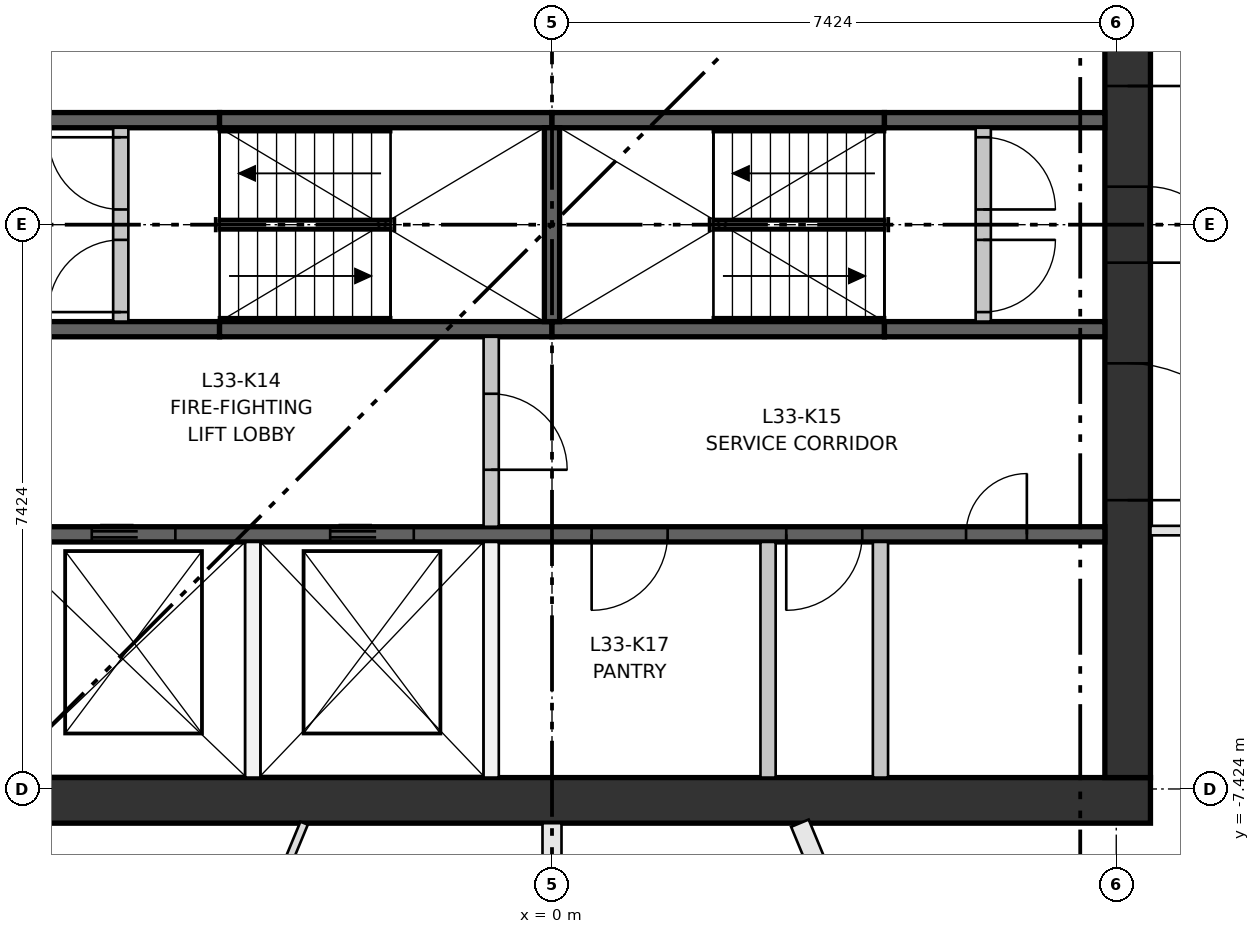
"""IFC4 building model, lengths in metres.
Left out: names, types, materials, properties, quantities, classifications, styles, units other than length and angle.
Written with IfcOpenShell. Run it as: python <this file> out.ifc"""

import sys

from ifc_helpers import new_model, si_unit, direction, frame, frame_2d, origin, place, context, subcontext, project, spatial, rectangle, extrude, element, fill, save


model = new_model("IFC4")
c1 = context("Model", 3, precision=1e-05, world=origin(), true_north=direction((0.0, 1.0)))
c2 = subcontext(c1, "Body", "Model", "MODEL_VIEW")
j1 = project(units=[si_unit("LENGTHUNIT", "METRE"), si_unit("PLANEANGLEUNIT", "RADIAN")], contexts=[c1])
p1 = place(None, origin())
s1 = spatial("IfcSite", under=j1, at=p1, CompositionType="ELEMENT")
p2 = place(p1, origin())
s2 = spatial("IfcBuilding", under=s1, at=p2, CompositionType="ELEMENT")
p3 = place(p2, frame((0.0, 0.0, 127.65)))
s3 = spatial("IfcBuildingStorey", under=s2, at=p3, CompositionType="ELEMENT", Elevation=127.65)
p4 = place(p3, frame((-7.874, -7.574, 0.0), z_axis=(0.0, 0.0, 1.0), x_axis=(1.0, 0.0, 0.0)))
e1 = element("IfcWall", 1, at=p4, inside=s3, PredefinedType="SHEAR", context=c2, shape_type="SweptSolid", body=[
    extrude(rectangle(XDim=15.748, YDim=0.6, at=frame_2d((7.874, 0.0))), origin(), (0.0, 0.0, 1.0), 3.35),
])
p5 = place(p3, frame((7.574, -7.274, 0.0), z_axis=(0.0, 0.0, 1.0), x_axis=(0.0, 1.0, 0.0)))
e2 = element("IfcWall", 2, at=p5, inside=s3, PredefinedType="SHEAR", context=c2, shape_type="SweptSolid", body=[
    extrude(rectangle(XDim=14.548, YDim=0.6, at=frame_2d((7.274, 0.0))), origin(), (0.0, 0.0, 1.0), 3.35),
])
p6 = place(p5, frame((6.774, 0.0, 0.0)))
e3 = element("IfcOpeningElement", 3, at=p6, cuts=e2, PredefinedType="OPENING", context=c2, shape_type="SweptSolid", body=[
    extrude(rectangle(XDim=1.0, YDim=2.1, at=frame_2d((0.5, 1.05))), frame((0.0, 0.31, 0.0), z_axis=(0.0, -1.0, 0.0), x_axis=(1.0, 0.0, 0.0)), (0.0, 0.0, 1.0), 0.62),
])
p7 = place(p5, frame((3.649, 0.0, 0.0)))
e4 = element("IfcOpeningElement", 4, at=p7, cuts=e2, PredefinedType="OPENING", context=c2, shape_type="SweptSolid", body=[
    extrude(rectangle(XDim=1.8, YDim=2.1, at=frame_2d((0.9, 1.05))), frame((0.0, 0.31, 0.0), z_axis=(0.0, -1.0, 0.0), x_axis=(1.0, 0.0, 0.0)), (0.0, 0.0, 1.0), 0.62),
])
p8 = place(p5, frame((9.098, 0.0, 0.0)))
e5 = element("IfcOpeningElement", 5, at=p8, cuts=e2, PredefinedType="OPENING", context=c2, shape_type="SweptSolid", body=[
    extrude(rectangle(XDim=1.8, YDim=2.1, at=frame_2d((0.9, 1.05))), frame((0.0, 0.31, 0.0), z_axis=(0.0, -1.0, 0.0), x_axis=(1.0, 0.0, 0.0)), (0.0, 0.0, 1.0), 0.62),
])
p9 = place(p3, frame((-7.274, -4.074, 0.0), z_axis=(0.0, 0.0, 1.0), x_axis=(1.0, 0.0, 0.0)))
e6 = element("IfcWall", 6, at=p9, inside=s3, PredefinedType="SHEAR", context=c2, shape_type="SweptSolid", body=[
    extrude(rectangle(XDim=14.548, YDim=0.2, at=frame_2d((7.274, 0.0))), origin(), (0.0, 0.0, 1.0), 3.0),
])
p10 = place(p9, frame((1.219, 0.0, 0.0)))
e7 = element("IfcOpeningElement", 7, at=p10, cuts=e6, PredefinedType="OPENING", context=c2, shape_type="SweptSolid", body=[
    extrude(rectangle(XDim=1.1, YDim=2.1, at=frame_2d((0.55, 1.05))), frame((0.0, 0.11, 0.0), z_axis=(0.0, -1.0, 0.0), x_axis=(1.0, 0.0, 0.0)), (0.0, 0.0, 1.0), 0.22),
])
p11 = place(p9, frame((4.355, 0.0, 0.0)))
e8 = element("IfcOpeningElement", 8, at=p11, cuts=e6, PredefinedType="OPENING", context=c2, shape_type="SweptSolid", body=[
    extrude(rectangle(XDim=1.1, YDim=2.1, at=frame_2d((0.55, 1.05))), frame((0.0, 0.11, 0.0), z_axis=(0.0, -1.0, 0.0), x_axis=(1.0, 0.0, 0.0)), (0.0, 0.0, 1.0), 0.22),
])
p12 = place(p9, frame((7.795, 0.0, 0.0)))
e9 = element("IfcOpeningElement", 9, at=p12, cuts=e6, PredefinedType="OPENING", context=c2, shape_type="SweptSolid", body=[
    extrude(rectangle(XDim=1.0, YDim=2.1, at=frame_2d((0.5, 1.05))), frame((0.0, 0.11, 0.0), z_axis=(0.0, -1.0, 0.0), x_axis=(1.0, 0.0, 0.0)), (0.0, 0.0, 1.0), 0.22),
])
p13 = place(p9, frame((10.356, 0.0, 0.0)))
e10 = element("IfcOpeningElement", 10, at=p13, cuts=e6, PredefinedType="OPENING", context=c2, shape_type="SweptSolid", body=[
    extrude(rectangle(XDim=1.0, YDim=2.1, at=frame_2d((0.5, 1.05))), frame((0.0, 0.11, 0.0), z_axis=(0.0, -1.0, 0.0), x_axis=(1.0, 0.0, 0.0)), (0.0, 0.0, 1.0), 0.22),
])
p14 = place(p9, frame((12.722, 0.0, 0.0)))
e11 = element("IfcOpeningElement", 11, at=p14, cuts=e6, PredefinedType="OPENING", context=c2, shape_type="SweptSolid", body=[
    extrude(rectangle(XDim=0.8, YDim=2.1, at=frame_2d((0.4, 1.05))), frame((0.0, 0.11, 0.0), z_axis=(0.0, -1.0, 0.0), x_axis=(1.0, 0.0, 0.0)), (0.0, 0.0, 1.0), 0.22),
])
p15 = place(p3, frame((-7.274, -1.375, 0.0), z_axis=(0.0, 0.0, 1.0), x_axis=(1.0, 0.0, 0.0)))
e12 = element("IfcWall", 12, at=p15, inside=s3, PredefinedType="SHEAR", context=c2, shape_type="SweptSolid", body=[
    extrude(rectangle(XDim=2.9, YDim=0.2, at=frame_2d((1.45, 0.0))), origin(), (0.0, 0.0, 1.0), 3.0),
])
for number, where, z_axis, x_axis in (
    (13, (-4.374, -1.375, 0.0), (0.0, 0.0, 1.0), (1.0, 0.0, 0.0)),
    (14, (0.0, -1.375, 0.0), (0.0, 0.0, 1.0), (1.0, 0.0, 0.0)),
):
    element("IfcWall", number, at=place(p3, frame(where, z_axis=z_axis, x_axis=x_axis)), inside=s3, PredefinedType="SHEAR", context=c2, shape_type="SweptSolid", body=[
        extrude(rectangle(XDim=4.374, YDim=0.2, at=frame_2d((2.187, 0.0))), origin(), (0.0, 0.0, 1.0), 3.0),
    ])
for number, where, z_axis, x_axis in (
    (15, (4.374, -1.375, 0.0), (0.0, 0.0, 1.0), (1.0, 0.0, 0.0)),
    (16, (-7.274, 1.375, 0.0), (0.0, 0.0, 1.0), (1.0, 0.0, 0.0)),
):
    element("IfcWall", number, at=place(p3, frame(where, z_axis=z_axis, x_axis=x_axis)), inside=s3, PredefinedType="SHEAR", context=c2, shape_type="SweptSolid", body=[
        extrude(rectangle(XDim=2.9, YDim=0.2, at=frame_2d((1.45, 0.0))), origin(), (0.0, 0.0, 1.0), 3.0),
    ])
for number, where, z_axis, x_axis in (
    (17, (-4.374, 1.375, 0.0), (0.0, 0.0, 1.0), (1.0, 0.0, 0.0)),
    (18, (0.0, 1.375, 0.0), (0.0, 0.0, 1.0), (1.0, 0.0, 0.0)),
):
    element("IfcWall", number, at=place(p3, frame(where, z_axis=z_axis, x_axis=x_axis)), inside=s3, PredefinedType="SHEAR", context=c2, shape_type="SweptSolid", body=[
        extrude(rectangle(XDim=4.374, YDim=0.2, at=frame_2d((2.187, 0.0))), origin(), (0.0, 0.0, 1.0), 3.0),
    ])
p16 = place(p3, frame((4.374, 1.375, 0.0), z_axis=(0.0, 0.0, 1.0), x_axis=(1.0, 0.0, 0.0)))
e19 = element("IfcWall", 19, at=p16, inside=s3, PredefinedType="SHEAR", context=c2, shape_type="SweptSolid", body=[
    extrude(rectangle(XDim=2.9, YDim=0.2, at=frame_2d((1.45, 0.0))), origin(), (0.0, 0.0, 1.0), 3.0),
])
p17 = place(p3, frame((0.0, -1.275, 0.0), z_axis=(0.0, 0.0, 1.0), x_axis=(0.0, 1.0, 0.0)))
e20 = element("IfcWall", 20, at=p17, inside=s3, PredefinedType="SHEAR", context=c2, shape_type="SweptSolid", body=[
    extrude(rectangle(XDim=2.55, YDim=0.2, at=frame_2d((1.275, 0.0))), origin(), (0.0, 0.0, 1.0), 3.0),
])
for number, where, z_axis, x_axis in (
    (21, (-3.937, -7.274, 0.0), (0.0, 0.0, 1.0), (0.0, 1.0, 0.0)),
    (22, (-0.8, -7.274, 0.0), (0.0, 0.0, 1.0), (0.0, 1.0, 0.0)),
):
    element("IfcWall", number, at=place(p3, frame(where, z_axis=z_axis, x_axis=x_axis)), inside=s3, PredefinedType="PARTITIONING", context=c2, shape_type="SweptSolid", body=[
        extrude(rectangle(XDim=3.1, YDim=0.2, at=frame_2d((1.55, 0.0))), origin(), (0.0, 0.0, 1.0), 3.0),
    ])
p18 = place(p3, frame((-0.8, -3.974, 0.0), z_axis=(0.0, 0.0, 1.0), x_axis=(0.0, 1.0, 0.0)))
e23 = element("IfcWall", 23, at=p18, inside=s3, PredefinedType="PARTITIONING", context=c2, shape_type="SweptSolid", body=[
    extrude(rectangle(XDim=2.499, YDim=0.2, at=frame_2d((1.25, 0.0))), origin(), (0.0, 0.0, 1.0), 3.0),
])
p19 = place(p18, frame((0.75, 0.0, 0.0)))
e24 = element("IfcOpeningElement", 24, at=p19, cuts=e23, PredefinedType="OPENING", context=c2, shape_type="SweptSolid", body=[
    extrude(rectangle(XDim=1.0, YDim=2.1, at=frame_2d((0.5, 1.05))), frame((0.0, 0.11, 0.0), z_axis=(0.0, -1.0, 0.0), x_axis=(1.0, 0.0, 0.0)), (0.0, 0.0, 1.0), 0.22),
])
for number, where, z_axis, x_axis in (
    (25, (2.843, -7.274, 0.0), (0.0, 0.0, 1.0), (0.0, 1.0, 0.0)),
    (26, (4.322, -7.274, 0.0), (0.0, 0.0, 1.0), (0.0, 1.0, 0.0)),
):
    element("IfcWall", number, at=place(p3, frame(where, z_axis=z_axis, x_axis=x_axis)), inside=s3, PredefinedType="PARTITIONING", context=c2, shape_type="SweptSolid", body=[
        extrude(rectangle(XDim=3.1, YDim=0.2, at=frame_2d((1.55, 0.0))), origin(), (0.0, 0.0, 1.0), 3.0),
    ])
p20 = place(p3, frame((-5.674, -1.275, 0.0), z_axis=(0.0, 0.0, 1.0), x_axis=(0.0, 1.0, 0.0)))
e27 = element("IfcWall", 27, at=p20, inside=s3, PredefinedType="PARTITIONING", context=c2, shape_type="SweptSolid", body=[
    extrude(rectangle(XDim=2.55, YDim=0.2, at=frame_2d((1.275, 0.0))), origin(), (0.0, 0.0, 1.0), 3.0),
])
p21 = place(p20, frame((0.125, 0.0, 0.0)))
e28 = element("IfcOpeningElement", 28, at=p21, cuts=e27, PredefinedType="OPENING", context=c2, shape_type="SweptSolid", body=[
    extrude(rectangle(XDim=0.95, YDim=2.1, at=frame_2d((0.475, 1.05))), frame((0.0, 0.11, 0.0), z_axis=(0.0, -1.0, 0.0), x_axis=(1.0, 0.0, 0.0)), (0.0, 0.0, 1.0), 0.22),
])
p22 = place(p20, frame((1.475, 0.0, 0.0)))
e29 = element("IfcOpeningElement", 29, at=p22, cuts=e27, PredefinedType="OPENING", context=c2, shape_type="SweptSolid", body=[
    extrude(rectangle(XDim=0.95, YDim=2.1, at=frame_2d((0.475, 1.05))), frame((0.0, 0.11, 0.0), z_axis=(0.0, -1.0, 0.0), x_axis=(1.0, 0.0, 0.0)), (0.0, 0.0, 1.0), 0.22),
])
p23 = place(p3, frame((5.674, -1.275, 0.0), z_axis=(0.0, 0.0, 1.0), x_axis=(0.0, 1.0, 0.0)))
e30 = element("IfcWall", 30, at=p23, inside=s3, PredefinedType="PARTITIONING", context=c2, shape_type="SweptSolid", body=[
    extrude(rectangle(XDim=2.55, YDim=0.2, at=frame_2d((1.275, 0.0))), origin(), (0.0, 0.0, 1.0), 3.0),
])
p24 = place(p23, frame((0.125, 0.0, 0.0)))
e31 = element("IfcOpeningElement", 31, at=p24, cuts=e30, PredefinedType="OPENING", context=c2, shape_type="SweptSolid", body=[
    extrude(rectangle(XDim=0.95, YDim=2.1, at=frame_2d((0.475, 1.05))), frame((0.0, 0.11, 0.0), z_axis=(0.0, -1.0, 0.0), x_axis=(1.0, 0.0, 0.0)), (0.0, 0.0, 1.0), 0.22),
])
p25 = place(p23, frame((1.475, 0.0, 0.0)))
e32 = element("IfcOpeningElement", 32, at=p25, cuts=e30, PredefinedType="OPENING", context=c2, shape_type="SweptSolid", body=[
    extrude(rectangle(XDim=0.95, YDim=2.1, at=frame_2d((0.475, 1.05))), frame((0.0, 0.11, 0.0), z_axis=(0.0, -1.0, 0.0), x_axis=(1.0, 0.0, 0.0)), (0.0, 0.0, 1.0), 0.22),
])
p26 = place(p3, frame((13.258, -4.024, 0.0), z_axis=(0.0, 0.0, 1.0), x_axis=(-1.0, 0.0, 0.0)))
e33 = element("IfcWall", 33, at=p26, inside=s3, PredefinedType="PARTITIONING", context=c2, shape_type="SweptSolid", body=[
    extrude(rectangle(XDim=5.384, YDim=0.125, at=frame_2d((2.692, 0.0))), origin(), (0.0, 0.0, 1.0), 3.0),
])
p27 = place(p26, frame((1.8, 0.0, 0.0)))
e34 = element("IfcOpeningElement", 34, at=p27, cuts=e33, PredefinedType="OPENING", context=c2, shape_type="SweptSolid", body=[
    extrude(rectangle(XDim=1.8, YDim=2.1, at=frame_2d((0.9, 1.05))), frame((0.0, 0.073, 0.0), z_axis=(0.0, -1.0, 0.0), x_axis=(1.0, 0.0, 0.0)), (0.0, 0.0, 1.0), 0.145),
])
p28 = place(p3, frame((-3.261, -7.874, 0.0), z_axis=(0.0, 0.0, 1.0), x_axis=(-0.382671840259, -0.923884334034, 0.0)))
e35 = element("IfcWall", 35, at=p28, inside=s3, PredefinedType="PARTITIONING", context=c2, shape_type="SweptSolid", body=[
    extrude(rectangle(XDim=6.737, YDim=0.105, at=frame_2d((3.369, 0.0))), origin(), (0.0, 0.0, 1.0), 3.0),
])
p29 = place(p3, frame((0.0, -7.874, 0.0), z_axis=(0.0, 0.0, 1.0), x_axis=(0.0, -1.0, 0.0)))
e36 = element("IfcWall", 36, at=p29, inside=s3, PredefinedType="PARTITIONING", context=c2, shape_type="SweptSolid", body=[
    extrude(rectangle(XDim=7.255, YDim=0.25, at=frame_2d((3.627, 0.0))), origin(), (0.0, 0.0, 1.0), 3.0),
])
p30 = place(p3, frame((5.84, -14.098, 0.0), z_axis=(0.0, 0.0, 1.0), x_axis=(-0.382671840259, 0.923884334034, 0.0)))
e37 = element("IfcWall", 37, at=p30, inside=s3, PredefinedType="PARTITIONING", context=c2, shape_type="SweptSolid", body=[
    extrude(rectangle(XDim=6.737, YDim=0.25, at=frame_2d((3.369, 0.0))), origin(), (0.0, 0.0, 1.0), 3.0),
])
p31 = place(p30, frame((2.9, 0.0, 0.0)))
e38 = element("IfcOpeningElement", 38, at=p31, cuts=e37, PredefinedType="OPENING", context=c2, shape_type="SweptSolid", body=[
    extrude(rectangle(XDim=1.0, YDim=2.1, at=frame_2d((0.5, 1.05))), frame((0.0, 0.135, 0.0), z_axis=(0.0, -1.0, 0.0), x_axis=(1.0, 0.0, 0.0)), (0.0, 0.0, 1.0), 0.27),
])
p32 = place(p10, origin())
e39 = element("IfcDoor", 39, at=p32, inside=s3, OperationType="DOUBLE_DOOR_SLIDING", PredefinedType="DOOR", context=c2, shape_type="SweptSolid", body=[
    extrude(rectangle(XDim=1.1, YDim=2.1, at=frame_2d((0.55, 1.05))), frame((0.0, 0.025, 0.0), z_axis=(0.0, -1.0, 0.0), x_axis=(1.0, 0.0, 0.0)), (0.0, 0.0, 1.0), 0.05),
])
fill(e7, e39)
p33 = place(p11, origin())
e40 = element("IfcDoor", 40, at=p33, inside=s3, OperationType="DOUBLE_DOOR_SLIDING", PredefinedType="DOOR", context=c2, shape_type="SweptSolid", body=[
    extrude(rectangle(XDim=1.1, YDim=2.1, at=frame_2d((0.55, 1.05))), frame((0.0, 0.025, 0.0), z_axis=(0.0, -1.0, 0.0), x_axis=(1.0, 0.0, 0.0)), (0.0, 0.0, 1.0), 0.05),
])
fill(e8, e40)
p34 = place(p21, origin())
e41 = element("IfcDoor", 41, at=p34, inside=s3, OperationType="SINGLE_SWING_LEFT", PredefinedType="DOOR", context=c2, shape_type="SweptSolid", body=[
    extrude(rectangle(XDim=0.95, YDim=2.1, at=frame_2d((0.475, 1.05))), frame((0.0, 0.025, 0.0), z_axis=(0.0, -1.0, 0.0), x_axis=(1.0, 0.0, 0.0)), (0.0, 0.0, 1.0), 0.05),
])
fill(e28, e41)
p35 = place(p22, origin())
e42 = element("IfcDoor", 42, at=p35, inside=s3, OperationType="SINGLE_SWING_RIGHT", PredefinedType="DOOR", context=c2, shape_type="SweptSolid", body=[
    extrude(rectangle(XDim=0.95, YDim=2.1, at=frame_2d((0.475, 1.05))), frame((0.0, 0.025, 0.0), z_axis=(0.0, -1.0, 0.0), x_axis=(1.0, 0.0, 0.0)), (0.0, 0.0, 1.0), 0.05),
])
fill(e29, e42)
p36 = place(p24, frame((0.95, 0.0, 0.0), z_axis=(0.0, 0.0, 1.0), x_axis=(-1.0, 0.0, 0.0)))
e43 = element("IfcDoor", 43, at=p36, inside=s3, OperationType="SINGLE_SWING_RIGHT", PredefinedType="DOOR", context=c2, shape_type="SweptSolid", body=[
    extrude(rectangle(XDim=0.95, YDim=2.1, at=frame_2d((0.475, 1.05))), frame((0.0, 0.025, 0.0), z_axis=(0.0, -1.0, 0.0), x_axis=(1.0, 0.0, 0.0)), (0.0, 0.0, 1.0), 0.05),
])
fill(e31, e43)
p37 = place(p25, frame((0.95, 0.0, 0.0), z_axis=(0.0, 0.0, 1.0), x_axis=(-1.0, 0.0, 0.0)))
e44 = element("IfcDoor", 44, at=p37, inside=s3, OperationType="SINGLE_SWING_LEFT", PredefinedType="DOOR", context=c2, shape_type="SweptSolid", body=[
    extrude(rectangle(XDim=0.95, YDim=2.1, at=frame_2d((0.475, 1.05))), frame((0.0, 0.025, 0.0), z_axis=(0.0, -1.0, 0.0), x_axis=(1.0, 0.0, 0.0)), (0.0, 0.0, 1.0), 0.05),
])
fill(e32, e44)
p38 = place(p19, frame((1.0, 0.0, 0.0), z_axis=(0.0, 0.0, 1.0), x_axis=(-1.0, 0.0, 0.0)))
e45 = element("IfcDoor", 45, at=p38, inside=s3, OperationType="SINGLE_SWING_LEFT", PredefinedType="DOOR", context=c2, shape_type="SweptSolid", body=[
    extrude(rectangle(XDim=1.0, YDim=2.1, at=frame_2d((0.5, 1.05))), frame((0.0, 0.025, 0.0), z_axis=(0.0, -1.0, 0.0), x_axis=(1.0, 0.0, 0.0)), (0.0, 0.0, 1.0), 0.05),
])
fill(e24, e45)
p39 = place(p12, frame((1.0, 0.0, 0.0), z_axis=(0.0, 0.0, 1.0), x_axis=(-1.0, 0.0, 0.0)))
e46 = element("IfcDoor", 46, at=p39, inside=s3, OperationType="SINGLE_SWING_LEFT", PredefinedType="DOOR", context=c2, shape_type="SweptSolid", body=[
    extrude(rectangle(XDim=1.0, YDim=2.1, at=frame_2d((0.5, 1.05))), frame((0.0, 0.025, 0.0), z_axis=(0.0, -1.0, 0.0), x_axis=(1.0, 0.0, 0.0)), (0.0, 0.0, 1.0), 0.05),
])
fill(e9, e46)
p40 = place(p13, frame((1.0, 0.0, 0.0), z_axis=(0.0, 0.0, 1.0), x_axis=(-1.0, 0.0, 0.0)))
e47 = element("IfcDoor", 47, at=p40, inside=s3, OperationType="SINGLE_SWING_LEFT", PredefinedType="DOOR", context=c2, shape_type="SweptSolid", body=[
    extrude(rectangle(XDim=1.0, YDim=2.1, at=frame_2d((0.5, 1.05))), frame((0.0, 0.025, 0.0), z_axis=(0.0, -1.0, 0.0), x_axis=(1.0, 0.0, 0.0)), (0.0, 0.0, 1.0), 0.05),
])
fill(e10, e47)
p41 = place(p14, origin())
e48 = element("IfcDoor", 48, at=p41, inside=s3, OperationType="SINGLE_SWING_RIGHT", PredefinedType="DOOR", context=c2, shape_type="SweptSolid", body=[
    extrude(rectangle(XDim=0.8, YDim=2.1, at=frame_2d((0.4, 1.05))), frame((0.0, 0.025, 0.0), z_axis=(0.0, -1.0, 0.0), x_axis=(1.0, 0.0, 0.0)), (0.0, 0.0, 1.0), 0.05),
])
fill(e11, e48)
p42 = place(p6, frame((1.0, 0.0, 0.0), z_axis=(0.0, 0.0, 1.0), x_axis=(-1.0, 0.0, 0.0)))
e49 = element("IfcDoor", 49, at=p42, inside=s3, OperationType="SINGLE_SWING_LEFT", PredefinedType="DOOR", context=c2, shape_type="SweptSolid", body=[
    extrude(rectangle(XDim=1.0, YDim=2.1, at=frame_2d((0.5, 1.05))), frame((0.0, 0.3, 0.0), z_axis=(0.0, -1.0, 0.0), x_axis=(1.0, 0.0, 0.0)), (0.0, 0.0, 1.0), 0.05),
])
fill(e3, e49)
p43 = place(p7, frame((1.8, 0.0, 0.0), z_axis=(0.0, 0.0, 1.0), x_axis=(-1.0, 0.0, 0.0)))
e50 = element("IfcDoor", 50, at=p43, inside=s3, OperationType="DOUBLE_DOOR_SINGLE_SWING", PredefinedType="DOOR", context=c2, shape_type="SweptSolid", body=[
    extrude(rectangle(XDim=1.8, YDim=2.1, at=frame_2d((0.9, 1.05))), frame((0.0, 0.025, 0.0), z_axis=(0.0, -1.0, 0.0), x_axis=(1.0, 0.0, 0.0)), (0.0, 0.0, 1.0), 0.05),
])
fill(e4, e50)
p44 = place(p8, frame((1.8, 0.0, 0.0), z_axis=(0.0, 0.0, 1.0), x_axis=(-1.0, 0.0, 0.0)))
e51 = element("IfcDoor", 51, at=p44, inside=s3, OperationType="DOUBLE_DOOR_SINGLE_SWING", PredefinedType="DOOR", context=c2, shape_type="SweptSolid", body=[
    extrude(rectangle(XDim=1.8, YDim=2.1, at=frame_2d((0.9, 1.05))), frame((0.0, 0.025, 0.0), z_axis=(0.0, -1.0, 0.0), x_axis=(1.0, 0.0, 0.0)), (0.0, 0.0, 1.0), 0.05),
])
fill(e5, e51)
save(model, sys.argv[1])
